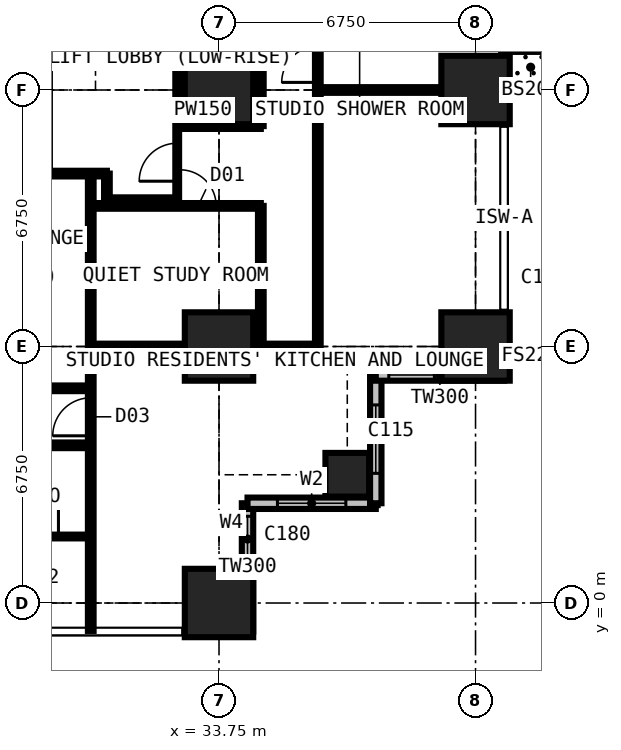
"""IFC4 building model, lengths in metres.
Left out: names, types, materials, properties, quantities, classifications, styles, units other than length and angle.
Written with IfcOpenShell. Run it as: python <this file> out.ifc"""

import sys

from ifc_helpers import new_model, si_unit, direction, frame, frame_2d, origin, origin_2d, place, context, subcontext, project, spatial, rectangle, extrude, element, fill, save


model = new_model("IFC4")
c1 = context("Model", 3, precision=1e-05, world=origin(), true_north=direction((0.0, 1.0)))
c2 = subcontext(c1, "Body", "Model", "MODEL_VIEW")
j1 = project(units=[si_unit("LENGTHUNIT", "METRE"), si_unit("PLANEANGLEUNIT", "RADIAN")], contexts=[c1])
p1 = place(None, origin())
s1 = spatial("IfcSite", under=j1, at=p1, CompositionType="ELEMENT")
p2 = place(p1, origin())
s2 = spatial("IfcBuilding", under=s1, at=p2, CompositionType="ELEMENT")
p3 = place(p2, frame((0.0, 0.0, 54.0)))
s3 = spatial("IfcBuildingStorey", under=s2, at=p3, CompositionType="ELEMENT", Elevation=54.0)
for number, where, z_axis, x_axis in (
    (1, (33.75, 0.0, 0.0), (0.0, 0.0, 1.0), (1.0, 0.0, 0.0)),
    (2, (33.75, 6.75, 0.0), (0.0, 0.0, 1.0), (1.0, 0.0, 0.0)),
    (3, (33.75, 13.5, 0.0), (0.0, 0.0, 1.0), (1.0, 0.0, 0.0)),
):
    element("IfcColumn", number, at=place(p3, frame(where, z_axis=z_axis, x_axis=x_axis)), inside=s3, PredefinedType="COLUMN", context=c2, shape_type="SweptSolid", body=[
        extrude(rectangle(XDim=1.8, YDim=1.8, at=origin_2d()), origin(), (0.0, 0.0, 1.0), 3.6),
    ])
p4 = place(p3, frame((37.125, 3.375, 0.0), z_axis=(0.0, 0.0, 1.0), x_axis=(1.0, 0.0, 0.0)))
e4 = element("IfcColumn", 4, at=p4, inside=s3, PredefinedType="COLUMN", context=c2, shape_type="SweptSolid", body=[
    extrude(rectangle(XDim=1.15, YDim=1.15, at=origin_2d()), origin(), (0.0, 0.0, 1.0), 3.6),
])
for number, where, z_axis, x_axis in (
    (5, (40.5, 6.75, 0.0), (0.0, 0.0, 1.0), (1.0, 0.0, 0.0)),
    (6, (40.5, 13.5, 0.0), (0.0, 0.0, 1.0), (1.0, 0.0, 0.0)),
):
    element("IfcColumn", number, at=place(p3, frame(where, z_axis=z_axis, x_axis=x_axis)), inside=s3, PredefinedType="COLUMN", context=c2, shape_type="SweptSolid", body=[
        extrude(rectangle(XDim=1.8, YDim=1.8, at=origin_2d()), origin(), (0.0, 0.0, 1.0), 3.6),
    ])
p5 = place(p3, frame((41.25, 20.25, 0.0), z_axis=(0.0, 0.0, 1.0), x_axis=(0.0, -1.0, 0.0)))
e7 = element("IfcWall", 7, at=p5, inside=s3, PredefinedType="SOLIDWALL", context=c2, shape_type="SweptSolid", body=[
    extrude(rectangle(XDim=6.75, YDim=0.15, at=frame_2d((3.375, 0.0))), origin(), (0.0, 0.0, 1.0), 3.375),
])
p6 = place(p5, frame((0.962, 0.0, 0.0)))
e8 = element("IfcOpeningElement", 8, at=p6, cuts=e7, PredefinedType="OPENING", context=c2, shape_type="SweptSolid", body=[
    extrude(rectangle(XDim=1.0, YDim=2.2, at=frame_2d((0.5, 1.1))), frame((0.0, 0.085, 0.0), z_axis=(0.0, -1.0, 0.0), x_axis=(1.0, 0.0, 0.0)), (0.0, 0.0, 1.0), 0.17),
])
p7 = place(p5, frame((2.025, 0.0, 0.9)))
e9 = element("IfcOpeningElement", 9, at=p7, cuts=e7, PredefinedType="OPENING", context=c2, shape_type="SweptSolid", body=[
    extrude(rectangle(XDim=1.2, YDim=1.8, at=frame_2d((0.6, 0.9))), frame((0.0, 0.085, 0.0), z_axis=(0.0, -1.0, 0.0), x_axis=(1.0, 0.0, 0.0)), (0.0, 0.0, 1.0), 0.17),
])
p8 = place(p5, frame((4.788, 0.0, 0.0)))
e10 = element("IfcOpeningElement", 10, at=p8, cuts=e7, PredefinedType="OPENING", context=c2, shape_type="SweptSolid", body=[
    extrude(rectangle(XDim=1.0, YDim=2.2, at=frame_2d((0.5, 1.1))), frame((0.0, 0.085, 0.0), z_axis=(0.0, -1.0, 0.0), x_axis=(1.0, 0.0, 0.0)), (0.0, 0.0, 1.0), 0.17),
])
p9 = place(p5, frame((3.525, 0.0, 0.9)))
e11 = element("IfcOpeningElement", 11, at=p9, cuts=e7, PredefinedType="OPENING", context=c2, shape_type="SweptSolid", body=[
    extrude(rectangle(XDim=1.2, YDim=1.8, at=frame_2d((0.6, 0.9))), frame((0.0, 0.085, 0.0), z_axis=(0.0, -1.0, 0.0), x_axis=(1.0, 0.0, 0.0)), (0.0, 0.0, 1.0), 0.17),
])
p10 = place(p3, frame((34.5, -0.75, 0.0), z_axis=(0.0, 0.0, 1.0), x_axis=(0.0, 1.0, 0.0)))
e12 = element("IfcWall", 12, at=p10, inside=s3, PredefinedType="SOLIDWALL", context=c2, shape_type="SweptSolid", body=[
    extrude(rectangle(XDim=3.375, YDim=0.3, at=frame_2d((1.688, 0.0))), origin(), (0.0, 0.0, 1.0), 3.375),
])
p11 = place(p10, frame((1.833, 0.0, 0.9)))
e13 = element("IfcOpeningElement", 13, at=p11, cuts=e12, PredefinedType="OPENING", context=c2, shape_type="SweptSolid", body=[
    extrude(rectangle(XDim=1.2, YDim=1.8, at=frame_2d((0.6, 0.9))), frame((0.0, 0.16, 0.0), z_axis=(0.0, -1.0, 0.0), x_axis=(1.0, 0.0, 0.0)), (0.0, 0.0, 1.0), 0.32),
])
p12 = place(p3, frame((34.5, 2.625, 0.0), z_axis=(0.0, 0.0, 1.0), x_axis=(1.0, 0.0, 0.0)))
e14 = element("IfcWall", 14, at=p12, inside=s3, PredefinedType="SOLIDWALL", context=c2, shape_type="SweptSolid", body=[
    extrude(rectangle(XDim=3.375, YDim=0.3, at=frame_2d((1.688, 0.0))), origin(), (0.0, 0.0, 1.0), 3.375),
])
p13 = place(p12, frame((0.788, 0.0, 0.6)))
e15 = element("IfcOpeningElement", 15, at=p13, cuts=e14, PredefinedType="OPENING", context=c2, shape_type="SweptSolid", body=[
    extrude(rectangle(XDim=1.8, YDim=2.1, at=frame_2d((0.9, 1.05))), frame((0.0, 0.16, 0.0), z_axis=(0.0, -1.0, 0.0), x_axis=(1.0, 0.0, 0.0)), (0.0, 0.0, 1.0), 0.32),
])
p14 = place(p3, frame((37.875, 2.625, 0.0), z_axis=(0.0, 0.0, 1.0), x_axis=(0.0, 1.0, 0.0)))
e16 = element("IfcWall", 16, at=p14, inside=s3, PredefinedType="SOLIDWALL", context=c2, shape_type="SweptSolid", body=[
    extrude(rectangle(XDim=3.375, YDim=0.3, at=frame_2d((1.688, 0.0))), origin(), (0.0, 0.0, 1.0), 3.375),
])
p15 = place(p14, frame((0.788, 0.0, 0.6)))
e17 = element("IfcOpeningElement", 17, at=p15, cuts=e16, PredefinedType="OPENING", context=c2, shape_type="SweptSolid", body=[
    extrude(rectangle(XDim=1.8, YDim=2.1, at=frame_2d((0.9, 1.05))), frame((0.0, 0.16, 0.0), z_axis=(0.0, -1.0, 0.0), x_axis=(1.0, 0.0, 0.0)), (0.0, 0.0, 1.0), 0.32),
])
p16 = place(p3, frame((37.875, 6.0, 0.0), z_axis=(0.0, 0.0, 1.0), x_axis=(1.0, 0.0, 0.0)))
e18 = element("IfcWall", 18, at=p16, inside=s3, PredefinedType="SOLIDWALL", context=c2, shape_type="SweptSolid", body=[
    extrude(rectangle(XDim=3.375, YDim=0.3, at=frame_2d((1.688, 0.0))), origin(), (0.0, 0.0, 1.0), 3.375),
])
p17 = place(p16, frame((0.343, 0.0, 0.9)))
e19 = element("IfcOpeningElement", 19, at=p17, cuts=e18, PredefinedType="OPENING", context=c2, shape_type="SweptSolid", body=[
    extrude(rectangle(XDim=1.2, YDim=1.8, at=frame_2d((0.6, 0.9))), frame((0.0, 0.16, 0.0), z_axis=(0.0, -1.0, 0.0), x_axis=(1.0, 0.0, 0.0)), (0.0, 0.0, 1.0), 0.32),
])
p18 = place(p3, frame((6.75, 4.15, 0.0), z_axis=(0.0, 0.0, 1.0), x_axis=(1.0, 0.0, 0.0)))
e20 = element("IfcWall", 20, at=p18, inside=s3, PredefinedType="PARTITIONING", context=c2, shape_type="SweptSolid", body=[
    extrude(rectangle(XDim=23.625, YDim=0.15, at=frame_2d((11.812, 0.0))), origin(), (0.0, 0.0, 1.0), 3.375),
])
p19 = place(p18, frame((0.2, 0.0, 0.0)))
e21 = element("IfcOpeningElement", 21, at=p19, cuts=e20, PredefinedType="OPENING", context=c2, shape_type="SweptSolid", body=[
    extrude(rectangle(XDim=0.95, YDim=2.2, at=frame_2d((0.475, 1.1))), frame((0.0, 0.085, 0.0), z_axis=(0.0, -1.0, 0.0), x_axis=(1.0, 0.0, 0.0)), (0.0, 0.0, 1.0), 0.17),
])
p20 = place(p18, frame((3.625, 0.0, 0.0)))
e22 = element("IfcOpeningElement", 22, at=p20, cuts=e20, PredefinedType="OPENING", context=c2, shape_type="SweptSolid", body=[
    extrude(rectangle(XDim=0.95, YDim=2.2, at=frame_2d((0.475, 1.1))), frame((0.0, 0.085, 0.0), z_axis=(0.0, -1.0, 0.0), x_axis=(1.0, 0.0, 0.0)), (0.0, 0.0, 1.0), 0.17),
])
p21 = place(p18, frame((18.475, 0.0, 0.0)))
e23 = element("IfcOpeningElement", 23, at=p21, cuts=e20, PredefinedType="OPENING", context=c2, shape_type="SweptSolid", body=[
    extrude(rectangle(XDim=0.95, YDim=2.2, at=frame_2d((0.475, 1.1))), frame((0.0, 0.085, 0.0), z_axis=(0.0, -1.0, 0.0), x_axis=(1.0, 0.0, 0.0)), (0.0, 0.0, 1.0), 0.17),
])
p22 = place(p18, frame((11.725, 0.0, 0.0)))
e24 = element("IfcOpeningElement", 24, at=p22, cuts=e20, PredefinedType="OPENING", context=c2, shape_type="SweptSolid", body=[
    extrude(rectangle(XDim=0.95, YDim=2.2, at=frame_2d((0.475, 1.1))), frame((0.0, 0.085, 0.0), z_axis=(0.0, -1.0, 0.0), x_axis=(1.0, 0.0, 0.0)), (0.0, 0.0, 1.0), 0.17),
])
p23 = place(p18, frame((6.95, 0.0, 0.0)))
e25 = element("IfcOpeningElement", 25, at=p23, cuts=e20, PredefinedType="OPENING", context=c2, shape_type="SweptSolid", body=[
    extrude(rectangle(XDim=0.95, YDim=2.2, at=frame_2d((0.475, 1.1))), frame((0.0, 0.085, 0.0), z_axis=(0.0, -1.0, 0.0), x_axis=(1.0, 0.0, 0.0)), (0.0, 0.0, 1.0), 0.17),
])
p24 = place(p3, frame((10.125, 11.3, 0.0), z_axis=(0.0, 0.0, 1.0), x_axis=(1.0, 0.0, 0.0)))
e26 = element("IfcWall", 26, at=p24, inside=s3, PredefinedType="PARTITIONING", context=c2, shape_type="SweptSolid", body=[
    extrude(rectangle(XDim=20.675, YDim=0.15, at=frame_2d((10.337, 0.0))), origin(), (0.0, 0.0, 1.0), 3.375),
])
p25 = place(p24, frame((1.775, 0.0, 0.0)))
e27 = element("IfcOpeningElement", 27, at=p25, cuts=e26, PredefinedType="OPENING", context=c2, shape_type="SweptSolid", body=[
    extrude(rectangle(XDim=1.0, YDim=2.2, at=frame_2d((0.5, 1.1))), frame((0.0, 0.085, 0.0), z_axis=(0.0, -1.0, 0.0), x_axis=(1.0, 0.0, 0.0)), (0.0, 0.0, 1.0), 0.17),
])
p26 = place(p24, frame((11.312, 0.0, 0.0)))
e28 = element("IfcOpeningElement", 28, at=p26, cuts=e26, PredefinedType="OPENING", context=c2, shape_type="SweptSolid", body=[
    extrude(rectangle(XDim=1.0, YDim=2.2, at=frame_2d((0.5, 1.1))), frame((0.0, 0.085, 0.0), z_axis=(0.0, -1.0, 0.0), x_axis=(1.0, 0.0, 0.0)), (0.0, 0.0, 1.0), 0.17),
])
p27 = place(p3, frame((22.988, 5.65, 0.0), z_axis=(0.0, 0.0, 1.0), x_axis=(1.0, 0.0, 0.0)))
e29 = element("IfcWall", 29, at=p27, inside=s3, PredefinedType="PARTITIONING", context=c2, shape_type="SweptSolid", body=[
    extrude(rectangle(XDim=7.387, YDim=0.15, at=frame_2d((3.694, 0.0))), origin(), (0.0, 0.0, 1.0), 3.375),
])
p28 = place(p27, frame((2.15, 0.0, 0.0)))
e30 = element("IfcOpeningElement", 30, at=p28, cuts=e29, PredefinedType="OPENING", context=c2, shape_type="SweptSolid", body=[
    extrude(rectangle(XDim=0.95, YDim=2.2, at=frame_2d((0.475, 1.1))), frame((0.0, 0.085, 0.0), z_axis=(0.0, -1.0, 0.0), x_axis=(1.0, 0.0, 0.0)), (0.0, 0.0, 1.0), 0.17),
])
p29 = place(p3, frame((27.775, 1.75, 0.0), z_axis=(0.0, 0.0, 1.0), x_axis=(1.0, 0.0, 0.0)))
e31 = element("IfcWall", 31, at=p29, inside=s3, PredefinedType="PARTITIONING", context=c2, shape_type="SweptSolid", body=[
    extrude(rectangle(XDim=2.6, YDim=0.1, at=frame_2d((1.3, 0.0))), origin(), (0.0, 0.0, 1.0), 3.375),
])
p30 = place(p29, frame((0.85, 0.0, 0.0)))
e32 = element("IfcOpeningElement", 32, at=p30, cuts=e31, PredefinedType="OPENING", context=c2, shape_type="SweptSolid", body=[
    extrude(rectangle(XDim=0.9, YDim=2.2, at=frame_2d((0.45, 1.1))), frame((0.0, 0.06, 0.0), z_axis=(0.0, -1.0, 0.0), x_axis=(1.0, 0.0, 0.0)), (0.0, 0.0, 1.0), 0.12),
])
p31 = place(p3, frame((30.375, -0.734, 0.0), z_axis=(0.0, 0.0, 1.0), x_axis=(0.0, 1.0, 0.0)))
e33 = element("IfcWall", 33, at=p31, inside=s3, PredefinedType="PARTITIONING", context=c2, shape_type="SweptSolid", body=[
    extrude(rectangle(XDim=12.034, YDim=0.15, at=frame_2d((6.017, 0.0))), origin(), (0.0, 0.0, 1.0), 3.375),
])
p32 = place(p31, frame((5.134, 0.0, 0.0)))
e34 = element("IfcOpeningElement", 34, at=p32, cuts=e33, PredefinedType="OPENING", context=c2, shape_type="SweptSolid", body=[
    extrude(rectangle(XDim=1.0, YDim=2.2, at=frame_2d((0.5, 1.1))), frame((0.0, 0.085, 0.0), z_axis=(0.0, -1.0, 0.0), x_axis=(1.0, 0.0, 0.0)), (0.0, 0.0, 1.0), 0.17),
])
p33 = place(p3, frame((30.375, 6.75, 0.0), z_axis=(0.0, 0.0, 1.0), x_axis=(1.0, 0.0, 0.0)))
e35 = element("IfcWall", 35, at=p33, inside=s3, PredefinedType="PARTITIONING", context=c2, shape_type="SweptSolid", body=[
    extrude(rectangle(XDim=5.975, YDim=0.15, at=frame_2d((2.988, 0.0))), origin(), (0.0, 0.0, 1.0), 2.877),
])
p34 = place(p3, frame((30.375, 10.45, 0.0), z_axis=(0.0, 0.0, 1.0), x_axis=(1.0, 0.0, 0.0)))
e36 = element("IfcWall", 36, at=p34, inside=s3, PredefinedType="PARTITIONING", context=c2, shape_type="SweptSolid", body=[
    extrude(rectangle(XDim=4.475, YDim=0.15, at=frame_2d((2.238, 0.0))), origin(), (0.0, 0.0, 1.0), 3.375),
])
p35 = place(p34, frame((2.35, 0.0, 0.0)))
e37 = element("IfcOpeningElement", 37, at=p35, cuts=e36, PredefinedType="OPENING", context=c2, shape_type="SweptSolid", body=[
    extrude(rectangle(XDim=0.95, YDim=2.2, at=frame_2d((0.475, 1.1))), frame((0.0, 0.085, 0.0), z_axis=(0.0, -1.0, 0.0), x_axis=(1.0, 0.0, 0.0)), (0.0, 0.0, 1.0), 0.17),
])
p36 = place(p3, frame((30.8, 10.6, 0.0), z_axis=(0.0, 0.0, 1.0), x_axis=(0.0, 1.0, 0.0)))
e38 = element("IfcWall", 38, at=p36, inside=s3, PredefinedType="PARTITIONING", context=c2, shape_type="SweptSolid", body=[
    extrude(rectangle(XDim=0.7, YDim=0.15, at=frame_2d((0.35, 0.0))), origin(), (0.0, 0.0, 1.0), 3.375),
])
p37 = place(p3, frame((30.8, 10.6, 0.0), z_axis=(0.0, 0.0, 1.0), x_axis=(1.0, 0.0, 0.0)))
e39 = element("IfcWall", 39, at=p37, inside=s3, PredefinedType="PARTITIONING", context=c2, shape_type="SweptSolid", body=[
    extrude(rectangle(XDim=1.85, YDim=0.15, at=frame_2d((0.925, 0.0))), origin(), (0.0, 0.0, 1.0), 3.375),
])
p38 = place(p3, frame((32.65, 10.6, 0.0), z_axis=(0.0, 0.0, 1.0), x_axis=(0.0, 1.0, 0.0)))
e40 = element("IfcWall", 40, at=p38, inside=s3, PredefinedType="SHEAR", context=c2, shape_type="SweptSolid", body=[
    extrude(rectangle(XDim=9.3, YDim=0.1, at=frame_2d((4.65, 0.0))), origin(), (0.0, 0.0, 1.0), 3.375),
])
p39 = place(p38, frame((0.5, 0.0, 0.0)))
e41 = element("IfcOpeningElement", 41, at=p39, cuts=e40, PredefinedType="OPENING", context=c2, shape_type="SweptSolid", body=[
    extrude(rectangle(XDim=1.0, YDim=2.2, at=frame_2d((0.5, 1.1))), frame((0.0, 0.06, 0.0), z_axis=(0.0, -1.0, 0.0), x_axis=(1.0, 0.0, 0.0)), (0.0, 0.0, 1.0), 0.12),
])
p40 = place(p3, frame((32.65, 12.55, 0.0), z_axis=(0.0, 0.0, 1.0), x_axis=(1.0, 0.0, 0.0)))
e42 = element("IfcWall", 42, at=p40, inside=s3, PredefinedType="PARTITIONING", context=c2, shape_type="SweptSolid", body=[
    extrude(rectangle(XDim=2.2, YDim=0.15, at=frame_2d((1.1, 0.0))), origin(), (0.0, 0.0, 1.0), 3.375),
])
p41 = place(p3, frame((34.85, 6.75, 0.0), z_axis=(0.0, 0.0, 1.0), x_axis=(0.0, 1.0, 0.0)))
e43 = element("IfcWall", 43, at=p41, inside=s3, PredefinedType="PARTITIONING", context=c2, shape_type="SweptSolid", body=[
    extrude(rectangle(XDim=3.7, YDim=0.15, at=frame_2d((1.85, 0.0))), origin(), (0.0, 0.0, 1.0), 3.375),
])
p42 = place(p3, frame((34.85, 12.55, 0.0), z_axis=(0.0, 0.0, 1.0), x_axis=(0.0, 1.0, 0.0)))
e44 = element("IfcWall", 44, at=p42, inside=s3, PredefinedType="PARTITIONING", context=c2, shape_type="SweptSolid", body=[
    extrude(rectangle(XDim=17.825, YDim=0.15, at=frame_2d((8.913, 0.0))), origin(), (0.0, 0.0, 1.0), 3.375),
])
p43 = place(p42, frame((8.6, 0.0, 0.0)))
e45 = element("IfcOpeningElement", 45, at=p43, cuts=e44, PredefinedType="OPENING", context=c2, shape_type="SweptSolid", body=[
    extrude(rectangle(XDim=0.95, YDim=2.2, at=frame_2d((0.475, 1.1))), frame((0.0, 0.085, 0.0), z_axis=(0.0, -1.0, 0.0), x_axis=(1.0, 0.0, 0.0)), (0.0, 0.0, 1.0), 0.17),
])
p44 = place(p3, frame((36.35, 6.75, 0.0), z_axis=(0.0, 0.0, 1.0), x_axis=(0.0, 1.0, 0.0)))
e46 = element("IfcWall", 46, at=p44, inside=s3, PredefinedType="PARTITIONING", context=c2, shape_type="SweptSolid", body=[
    extrude(rectangle(XDim=23.625, YDim=0.15, at=frame_2d((11.812, 0.0))), origin(), (0.0, 0.0, 1.0), 3.375),
])
p45 = place(p44, frame((18.475, 0.0, 0.0)))
e47 = element("IfcOpeningElement", 47, at=p45, cuts=e46, PredefinedType="OPENING", context=c2, shape_type="SweptSolid", body=[
    extrude(rectangle(XDim=0.95, YDim=2.2, at=frame_2d((0.475, 1.1))), frame((0.0, 0.085, 0.0), z_axis=(0.0, -1.0, 0.0), x_axis=(1.0, 0.0, 0.0)), (0.0, 0.0, 1.0), 0.17),
])
p46 = place(p44, frame((11.725, 0.0, 0.0)))
e48 = element("IfcOpeningElement", 48, at=p46, cuts=e46, PredefinedType="OPENING", context=c2, shape_type="SweptSolid", body=[
    extrude(rectangle(XDim=0.95, YDim=2.2, at=frame_2d((0.475, 1.1))), frame((0.0, 0.085, 0.0), z_axis=(0.0, -1.0, 0.0), x_axis=(1.0, 0.0, 0.0)), (0.0, 0.0, 1.0), 0.17),
])
p47 = place(p44, frame((6.95, 0.0, 0.0)))
e49 = element("IfcOpeningElement", 49, at=p47, cuts=e46, PredefinedType="OPENING", context=c2, shape_type="SweptSolid", body=[
    extrude(rectangle(XDim=0.95, YDim=2.2, at=frame_2d((0.475, 1.1))), frame((0.0, 0.085, 0.0), z_axis=(0.0, -1.0, 0.0), x_axis=(1.0, 0.0, 0.0)), (0.0, 0.0, 1.0), 0.17),
])
p48 = place(p3, frame((36.35, 13.5, 0.0), z_axis=(0.0, 0.0, 1.0), x_axis=(1.0, 0.0, 0.0)))
e50 = element("IfcWall", 50, at=p48, inside=s3, PredefinedType="PARTITIONING", context=c2, shape_type="SweptSolid", body=[
    extrude(rectangle(XDim=4.884, YDim=0.15, at=frame_2d((2.442, 0.0))), origin(), (0.0, 0.0, 1.0), 2.877),
])
p49 = place(p8, origin())
e51 = element("IfcDoor", 51, at=p49, inside=s3, OperationType="SINGLE_SWING_RIGHT", PredefinedType="DOOR", context=c2, shape_type="SweptSolid", body=[
    extrude(rectangle(XDim=1.0, YDim=2.2, at=frame_2d((0.5, 1.1))), frame((0.0, 0.025, 0.0), z_axis=(0.0, -1.0, 0.0), x_axis=(1.0, 0.0, 0.0)), (0.0, 0.0, 1.0), 0.05),
])
fill(e10, e51)
p50 = place(p11, origin())
e52 = element("IfcWindow", 52, at=p50, inside=s3, PartitioningType="SINGLE_PANEL", PredefinedType="WINDOW", context=c2, shape_type="SweptSolid", body=[
    extrude(rectangle(XDim=1.2, YDim=1.8, at=frame_2d((0.6, 0.9))), frame((0.0, 0.03, 0.0), z_axis=(0.0, -1.0, 0.0), x_axis=(1.0, 0.0, 0.0)), (0.0, 0.0, 1.0), 0.06),
])
fill(e13, e52)
p51 = place(p13, origin())
e53 = element("IfcWindow", 53, at=p51, inside=s3, PartitioningType="SINGLE_PANEL", PredefinedType="WINDOW", context=c2, shape_type="SweptSolid", body=[
    extrude(rectangle(XDim=1.8, YDim=2.1, at=frame_2d((0.9, 1.05))), frame((0.0, 0.03, 0.0), z_axis=(0.0, -1.0, 0.0), x_axis=(1.0, 0.0, 0.0)), (0.0, 0.0, 1.0), 0.06),
])
fill(e15, e53)
p52 = place(p15, origin())
e54 = element("IfcWindow", 54, at=p52, inside=s3, PartitioningType="SINGLE_PANEL", PredefinedType="WINDOW", context=c2, shape_type="SweptSolid", body=[
    extrude(rectangle(XDim=1.8, YDim=2.1, at=frame_2d((0.9, 1.05))), frame((0.0, 0.03, 0.0), z_axis=(0.0, -1.0, 0.0), x_axis=(1.0, 0.0, 0.0)), (0.0, 0.0, 1.0), 0.06),
])
fill(e17, e54)
p53 = place(p17, origin())
e55 = element("IfcWindow", 55, at=p53, inside=s3, PartitioningType="SINGLE_PANEL", PredefinedType="WINDOW", context=c2, shape_type="SweptSolid", body=[
    extrude(rectangle(XDim=1.2, YDim=1.8, at=frame_2d((0.6, 0.9))), frame((0.0, 0.03, 0.0), z_axis=(0.0, -1.0, 0.0), x_axis=(1.0, 0.0, 0.0)), (0.0, 0.0, 1.0), 0.06),
])
fill(e19, e55)
p54 = place(p30, origin())
e56 = element("IfcDoor", 56, at=p54, inside=s3, OperationType="SINGLE_SWING_RIGHT", PredefinedType="DOOR", context=c2, shape_type="SweptSolid", body=[
    extrude(rectangle(XDim=0.9, YDim=2.2, at=frame_2d((0.45, 1.1))), frame((0.0, 0.025, 0.0), z_axis=(0.0, -1.0, 0.0), x_axis=(1.0, 0.0, 0.0)), (0.0, 0.0, 1.0), 0.05),
])
fill(e32, e56)
p55 = place(p32, origin())
e57 = element("IfcDoor", 57, at=p55, inside=s3, OperationType="SINGLE_SWING_LEFT", PredefinedType="DOOR", context=c2, shape_type="SweptSolid", body=[
    extrude(rectangle(XDim=1.0, YDim=2.2, at=frame_2d((0.5, 1.1))), frame((0.0, 0.025, 0.0), z_axis=(0.0, -1.0, 0.0), x_axis=(1.0, 0.0, 0.0)), (0.0, 0.0, 1.0), 0.05),
])
fill(e34, e57)
p56 = place(p47, origin())
e58 = element("IfcDoor", 58, at=p56, inside=s3, OperationType="SINGLE_SWING_LEFT", PredefinedType="DOOR", context=c2, shape_type="SweptSolid", body=[
    extrude(rectangle(XDim=0.95, YDim=2.2, at=frame_2d((0.475, 1.1))), frame((0.0, 0.025, 0.0), z_axis=(0.0, -1.0, 0.0), x_axis=(1.0, 0.0, 0.0)), (0.0, 0.0, 1.0), 0.05),
])
fill(e49, e58)
p57 = place(p39, origin())
e59 = element("IfcDoor", 59, at=p57, inside=s3, OperationType="SINGLE_SWING_LEFT", PredefinedType="DOOR", context=c2, shape_type="SweptSolid", body=[
    extrude(rectangle(XDim=1.0, YDim=2.2, at=frame_2d((0.5, 1.1))), frame((0.0, 0.025, 0.0), z_axis=(0.0, -1.0, 0.0), x_axis=(1.0, 0.0, 0.0)), (0.0, 0.0, 1.0), 0.05),
])
fill(e41, e59)
p58 = place(p35, origin())
e60 = element("IfcDoor", 60, at=p58, inside=s3, OperationType="SINGLE_SWING_LEFT", PredefinedType="DOOR", context=c2, shape_type="SweptSolid", body=[
    extrude(rectangle(XDim=0.95, YDim=2.2, at=frame_2d((0.475, 1.1))), frame((0.0, 0.025, 0.0), z_axis=(0.0, -1.0, 0.0), x_axis=(1.0, 0.0, 0.0)), (0.0, 0.0, 1.0), 0.05),
])
fill(e37, e60)
save(model, sys.argv[1])
